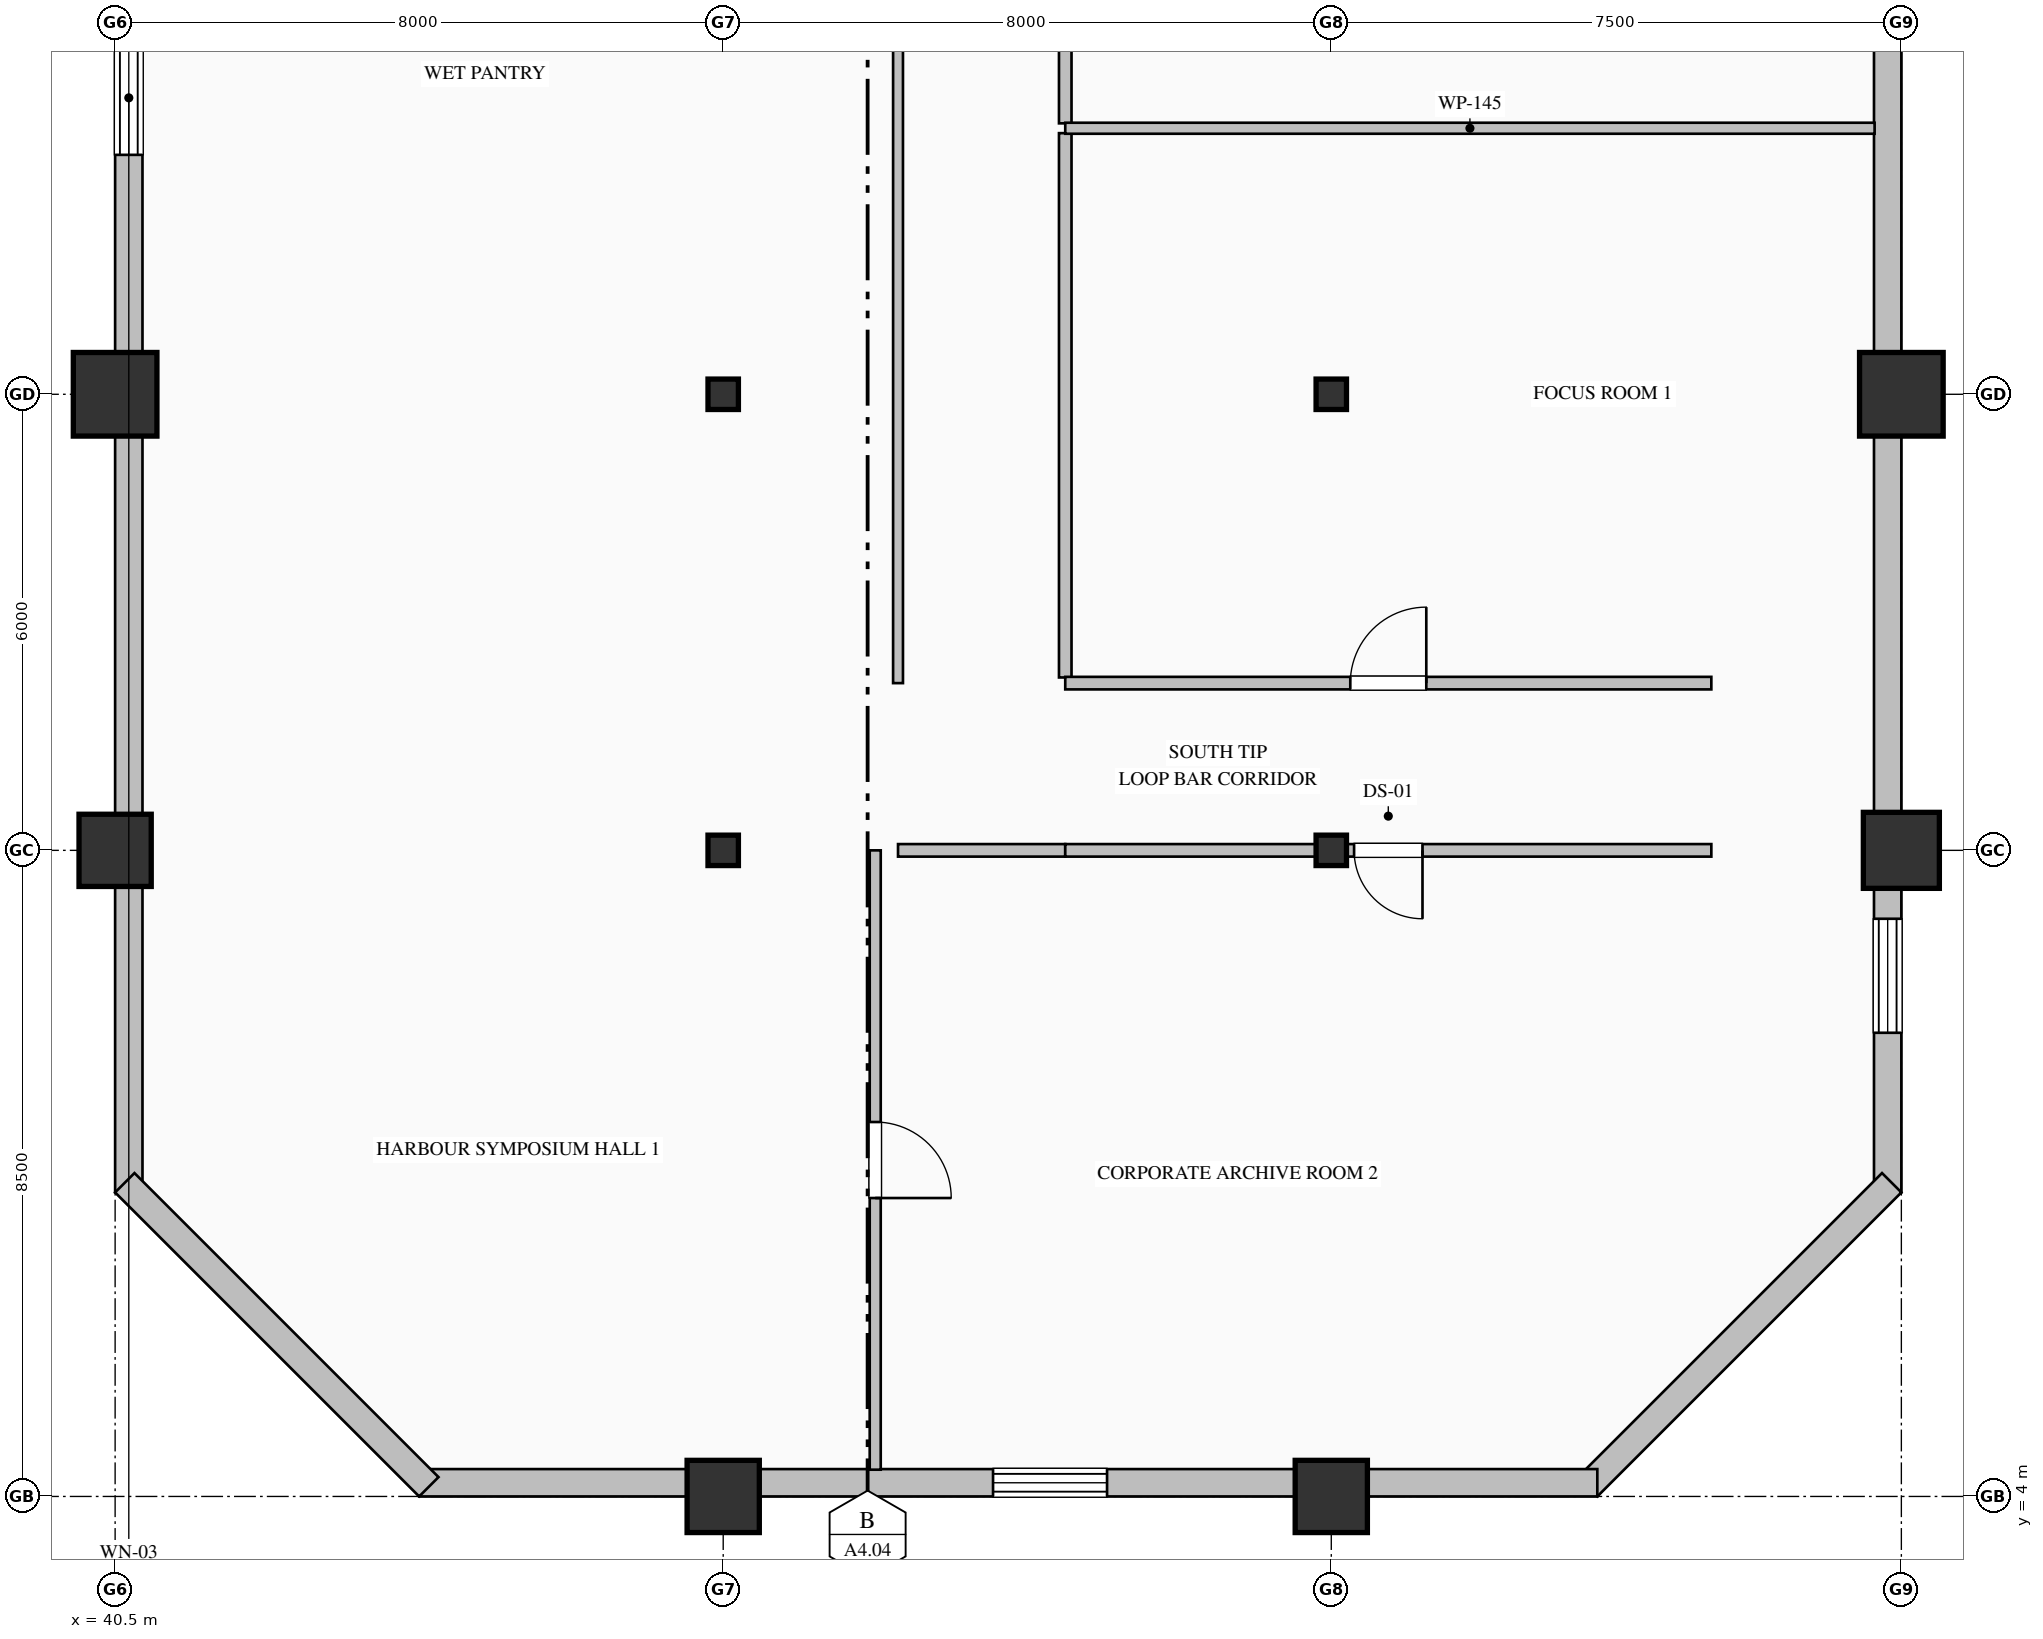
"""IFC4 building model, lengths in metres.
Left out: names, types, materials, properties, quantities, classifications, styles, units other than length and angle.
Written with IfcOpenShell. Run it as: python <this file> out.ifc"""

import sys

from ifc_helpers import new_model, si_unit, direction, frame, frame_2d, origin, origin_2d, place, context, subcontext, project, spatial, rectangle, hollow_rectangle, hollow_circle, i_section, extrude, element, fill, save


model = new_model("IFC4")
c1 = context("Model", 3, precision=1e-05, world=origin(), true_north=direction((0.0, 1.0)))
c2 = subcontext(c1, "Body", "Model", "MODEL_VIEW")
j1 = project(units=[si_unit("LENGTHUNIT", "METRE"), si_unit("PLANEANGLEUNIT", "RADIAN")], contexts=[c1])
p1 = place(None, origin())
s1 = spatial("IfcSite", under=j1, at=p1, CompositionType="ELEMENT")
p2 = place(p1, origin())
s2 = spatial("IfcBuilding", under=s1, at=p2, CompositionType="ELEMENT")
p3 = place(p2, frame((0.0, 0.0, 151.0)))
s3 = spatial("IfcBuildingStorey", under=s2, at=p3, CompositionType="ELEMENT", Elevation=151.0)
p4 = place(p3, frame((40.5, 12.5, 0.0), z_axis=(0.0, 0.0, 1.0), x_axis=(1.0, 0.0, 0.0)))
e1 = element("IfcColumn", 1, at=p4, inside=s3, PredefinedType="COLUMN", context=c2, shape_type="SweptSolid", body=[
    extrude(hollow_rectangle(XDim=0.95, YDim=0.95, WallThickness=0.036, at=origin_2d()), origin(), (0.0, 0.0, 1.0), 4.0),
])
p5 = place(p3, frame((40.5, 18.5, 0.0), z_axis=(0.0, 0.0, 1.0), x_axis=(1.0, 0.0, 0.0)))
e2 = element("IfcColumn", 2, at=p5, inside=s3, PredefinedType="COLUMN", context=c2, shape_type="SweptSolid", body=[
    extrude(hollow_rectangle(XDim=1.1, YDim=1.1, WallThickness=0.04, at=origin_2d()), origin(), (0.0, 0.0, 1.0), 4.0),
])
p6 = place(p3, frame((48.5, 4.0, 0.0), z_axis=(0.0, 0.0, 1.0), x_axis=(1.0, 0.0, 0.0)))
e3 = element("IfcColumn", 3, at=p6, inside=s3, PredefinedType="COLUMN", context=c2, shape_type="SweptSolid", body=[
    extrude(hollow_rectangle(XDim=0.95, YDim=0.95, WallThickness=0.036, at=origin_2d()), origin(), (0.0, 0.0, 1.0), 4.0),
])
for number, where, z_axis, x_axis in (
    (4, (48.5, 12.5, 0.0), (0.0, 0.0, 1.0), (1.0, 0.0, 0.0)),
    (5, (48.5, 18.5, 0.0), (0.0, 0.0, 1.0), (1.0, 0.0, 0.0)),
):
    element("IfcColumn", number, at=place(p3, frame(where, z_axis=z_axis, x_axis=x_axis)), inside=s3, PredefinedType="COLUMN", context=c2, shape_type="SweptSolid", body=[
        extrude(i_section(OverallWidth=0.4, OverallDepth=0.4, WebThickness=0.013, FlangeThickness=0.021, FilletRadius=0.022, at=origin_2d()), origin(), (0.0, 0.0, 1.0), 4.0),
    ])
p7 = place(p3, frame((56.5, 4.0, 0.0), z_axis=(0.0, 0.0, 1.0), x_axis=(1.0, 0.0, 0.0)))
e6 = element("IfcColumn", 6, at=p7, inside=s3, PredefinedType="COLUMN", context=c2, shape_type="SweptSolid", body=[
    extrude(hollow_rectangle(XDim=0.95, YDim=0.95, WallThickness=0.036, at=origin_2d()), origin(), (0.0, 0.0, 1.0), 4.0),
])
for number, where, z_axis, x_axis in (
    (7, (56.5, 12.5, 0.0), (0.0, 0.0, 1.0), (1.0, 0.0, 0.0)),
    (8, (56.5, 18.5, 0.0), (0.0, 0.0, 1.0), (1.0, 0.0, 0.0)),
):
    element("IfcColumn", number, at=place(p3, frame(where, z_axis=z_axis, x_axis=x_axis)), inside=s3, PredefinedType="COLUMN", context=c2, shape_type="SweptSolid", body=[
        extrude(i_section(OverallWidth=0.4, OverallDepth=0.4, WebThickness=0.013, FlangeThickness=0.021, FilletRadius=0.022, at=origin_2d()), origin(), (0.0, 0.0, 1.0), 4.0),
    ])
p8 = place(p3, frame((64.0, 12.5, 0.0), z_axis=(0.0, 0.0, 1.0), x_axis=(1.0, 0.0, 0.0)))
e9 = element("IfcColumn", 9, at=p8, inside=s3, PredefinedType="COLUMN", context=c2, shape_type="SweptSolid", body=[
    extrude(hollow_circle(Radius=0.5, WallThickness=0.036, at=origin_2d()), origin(), (0.0, 0.0, 1.0), 4.0),
])
p9 = place(p3, frame((64.0, 18.5, 0.0), z_axis=(0.0, 0.0, 1.0), x_axis=(1.0, 0.0, 0.0)))
e10 = element("IfcColumn", 10, at=p9, inside=s3, PredefinedType="COLUMN", context=c2, shape_type="SweptSolid", body=[
    extrude(hollow_rectangle(XDim=1.1, YDim=1.1, WallThickness=0.04, at=origin_2d()), origin(), (0.0, 0.0, 1.0), 4.0),
])
p10 = place(p3, frame((40.68, 8.0, 0.0), z_axis=(0.0, 0.0, 1.0), x_axis=(0.0, 1.0, 0.0)))
e11 = element("IfcWall", 11, at=p10, inside=s3, PredefinedType="SOLIDWALL", context=c2, shape_type="SweptSolid", body=[
    extrude(rectangle(XDim=20.36, YDim=0.36, at=frame_2d((10.18, 0.0))), origin(), (0.0, 0.0, 1.0), 3.165),
])
p11 = place(p10, frame((13.65, 0.0, 0.85)))
e12 = element("IfcOpeningElement", 12, at=p11, cuts=e11, PredefinedType="OPENING", context=c2, shape_type="SweptSolid", body=[
    extrude(rectangle(XDim=1.5, YDim=1.95, at=frame_2d((0.75, 0.975))), frame((0.0, 0.19, 0.0), z_axis=(0.0, -1.0, 0.0), x_axis=(1.0, 0.0, 0.0)), (0.0, 0.0, 1.0), 0.38),
])
p12 = place(p3, frame((63.82, 36.05, 0.0), z_axis=(0.0, 0.0, 1.0), x_axis=(0.0, -1.0, 0.0)))
e13 = element("IfcWall", 13, at=p12, inside=s3, PredefinedType="SOLIDWALL", context=c2, shape_type="SweptSolid", body=[
    extrude(rectangle(XDim=28.05, YDim=0.36, at=frame_2d((14.025, 0.0))), origin(), (0.0, 0.0, 1.0), 3.265),
])
p13 = place(p12, frame((2.85, 0.0, 0.85)))
e14 = element("IfcOpeningElement", 14, at=p13, cuts=e13, PredefinedType="OPENING", context=c2, shape_type="SweptSolid", body=[
    extrude(rectangle(XDim=1.5, YDim=1.95, at=frame_2d((0.75, 0.975))), frame((0.0, 0.19, 0.0), z_axis=(0.0, -1.0, 0.0), x_axis=(1.0, 0.0, 0.0)), (0.0, 0.0, 1.0), 0.38),
])
p14 = place(p12, frame((10.2, 0.0, 0.7)))
e15 = element("IfcOpeningElement", 15, at=p14, cuts=e13, PredefinedType="OPENING", context=c2, shape_type="SweptSolid", body=[
    extrude(rectangle(XDim=1.2, YDim=1.85, at=frame_2d((0.6, 0.925))), frame((0.0, 0.19, 0.0), z_axis=(0.0, -1.0, 0.0), x_axis=(1.0, 0.0, 0.0)), (0.0, 0.0, 1.0), 0.38),
])
p15 = place(p12, frame((24.45, 0.0, 0.85)))
e16 = element("IfcOpeningElement", 16, at=p15, cuts=e13, PredefinedType="OPENING", context=c2, shape_type="SweptSolid", body=[
    extrude(rectangle(XDim=1.5, YDim=1.95, at=frame_2d((0.75, 0.975))), frame((0.0, 0.19, 0.0), z_axis=(0.0, -1.0, 0.0), x_axis=(1.0, 0.0, 0.0)), (0.0, 0.0, 1.0), 0.38),
])
p16 = place(p3, frame((63.873, 8.127, 0.0), z_axis=(0.0, 0.0, 1.0), x_axis=(-0.707106781187, -0.707106781187, 0.0)))
e17 = element("IfcWall", 17, at=p16, inside=s3, PredefinedType="SOLIDWALL", context=c2, shape_type="SweptSolid", body=[
    extrude(rectangle(XDim=5.657, YDim=0.36, at=frame_2d((2.828, 0.0))), origin(), (0.0, 0.0, 1.0), 3.765),
])
p17 = place(p3, frame((60.0, 4.18, 0.0), z_axis=(0.0, 0.0, 1.0), x_axis=(-1.0, 0.0, 0.0)))
e18 = element("IfcWall", 18, at=p17, inside=s3, PredefinedType="SOLIDWALL", context=c2, shape_type="SweptSolid", body=[
    extrude(rectangle(XDim=15.5, YDim=0.36, at=frame_2d((7.75, 0.0))), origin(), (0.0, 0.0, 1.0), 3.265),
])
p18 = place(p17, frame((6.45, 0.0, 0.85)))
e19 = element("IfcOpeningElement", 19, at=p18, cuts=e18, PredefinedType="OPENING", context=c2, shape_type="SweptSolid", body=[
    extrude(rectangle(XDim=1.5, YDim=1.95, at=frame_2d((0.75, 0.975))), frame((0.0, 0.19, 0.0), z_axis=(0.0, -1.0, 0.0), x_axis=(1.0, 0.0, 0.0)), (0.0, 0.0, 1.0), 0.38),
])
p19 = place(p3, frame((44.627, 4.127, 0.0), z_axis=(0.0, 0.0, 1.0), x_axis=(-0.707106781187, 0.707106781187, 0.0)))
e20 = element("IfcWall", 20, at=p19, inside=s3, PredefinedType="SOLIDWALL", context=c2, shape_type="SweptSolid", body=[
    extrude(rectangle(XDim=5.657, YDim=0.36, at=frame_2d((2.828, 0.0))), origin(), (0.0, 0.0, 1.0), 3.765),
])
p20 = place(p3, frame((53.0, 33.525, 0.0), z_axis=(0.0, 0.0, 1.0), x_axis=(0.0, -1.0, 0.0)))
e21 = element("IfcWall", 21, at=p20, inside=s3, PredefinedType="PARTITIONING", context=c2, shape_type="SweptSolid", body=[
    extrude(rectangle(XDim=11.461, YDim=0.165, at=frame_2d((5.73, 0.0))), origin(), (0.0, 0.0, 1.0), 3.765),
])
p21 = place(p20, frame((5.23, 0.0, 0.0)))
e22 = element("IfcOpeningElement", 22, at=p21, cuts=e21, PredefinedType="OPENING", context=c2, shape_type="SweptSolid", body=[
    extrude(rectangle(XDim=1.0, YDim=2.15, at=frame_2d((0.5, 1.075))), frame((0.0, 0.093, 0.0), z_axis=(0.0, -1.0, 0.0), x_axis=(1.0, 0.0, 0.0)), (0.0, 0.0, 1.0), 0.185),
])
p22 = place(p3, frame((53.0, 21.936, 0.0), z_axis=(0.0, 0.0, 1.0), x_axis=(0.0, -1.0, 0.0)))
e23 = element("IfcWall", 23, at=p22, inside=s3, PredefinedType="PARTITIONING", context=c2, shape_type="SweptSolid", body=[
    extrude(rectangle(XDim=7.161, YDim=0.165, at=frame_2d((3.581, 0.0))), origin(), (0.0, 0.0, 1.0), 3.765),
])
p23 = place(p3, frame((50.8, 14.7, 0.0), z_axis=(0.0, 0.0, 1.0), x_axis=(0.0, 1.0, 0.0)))
e24 = element("IfcWall", 24, at=p23, inside=s3, PredefinedType="PARTITIONING", context=c2, shape_type="SweptSolid", body=[
    extrude(rectangle(XDim=18.843, YDim=0.13, at=frame_2d((9.421, 0.0))), origin(), (0.0, 0.0, 1.0), 3.765),
])
p24 = place(p23, frame((8.921, 0.0, 0.0)))
e25 = element("IfcOpeningElement", 25, at=p24, cuts=e24, PredefinedType="OPENING", context=c2, shape_type="SweptSolid", body=[
    extrude(rectangle(XDim=1.0, YDim=2.15, at=frame_2d((0.5, 1.075))), frame((0.0, 0.075, 0.0), z_axis=(0.0, -1.0, 0.0), x_axis=(1.0, 0.0, 0.0)), (0.0, 0.0, 1.0), 0.15),
])
p25 = place(p3, frame((53.0, 12.5, 0.0), z_axis=(0.0, 0.0, 1.0), x_axis=(-1.0, 0.0, 0.0)))
e26 = element("IfcWall", 26, at=p25, inside=s3, PredefinedType="PARTITIONING", context=c2, shape_type="SweptSolid", body=[
    extrude(rectangle(XDim=2.2, YDim=0.165, at=frame_2d((1.1, 0.0))), origin(), (0.0, 0.0, 1.0), 3.157),
])
p26 = place(p3, frame((53.0, 14.7, 0.0), z_axis=(0.0, 0.0, 1.0), x_axis=(1.0, 0.0, 0.0)))
e27 = element("IfcWall", 27, at=p26, inside=s3, PredefinedType="PARTITIONING", context=c2, shape_type="SweptSolid", body=[
    extrude(rectangle(XDim=8.5, YDim=0.165, at=frame_2d((4.25, 0.0))), origin(), (0.0, 0.0, 1.0), 3.765),
])
p27 = place(p26, frame((3.75, 0.0, 0.0)))
e28 = element("IfcOpeningElement", 28, at=p27, cuts=e27, PredefinedType="OPENING", context=c2, shape_type="SweptSolid", body=[
    extrude(rectangle(XDim=1.0, YDim=2.15, at=frame_2d((0.5, 1.075))), frame((0.0, 0.093, 0.0), z_axis=(0.0, -1.0, 0.0), x_axis=(1.0, 0.0, 0.0)), (0.0, 0.0, 1.0), 0.185),
])
p28 = place(p3, frame((61.5, 12.5, 0.0), z_axis=(0.0, 0.0, 1.0), x_axis=(-1.0, 0.0, 0.0)))
e29 = element("IfcWall", 29, at=p28, inside=s3, PredefinedType="PARTITIONING", context=c2, shape_type="SweptSolid", body=[
    extrude(rectangle(XDim=8.5, YDim=0.165, at=frame_2d((4.25, 0.0))), origin(), (0.0, 0.0, 1.0), 3.157),
])
p29 = place(p28, frame((3.8, 0.0, 0.0)))
e30 = element("IfcOpeningElement", 30, at=p29, cuts=e29, PredefinedType="OPENING", context=c2, shape_type="SweptSolid", body=[
    extrude(rectangle(XDim=0.9, YDim=2.15, at=frame_2d((0.45, 1.075))), frame((0.0, 0.093, 0.0), z_axis=(0.0, -1.0, 0.0), x_axis=(1.0, 0.0, 0.0)), (0.0, 0.0, 1.0), 0.185),
])
p30 = place(p3, frame((63.648, 22.0, 0.0), z_axis=(0.0, 0.0, 1.0), x_axis=(-1.0, 0.0, 0.0)))
e31 = element("IfcWall", 31, at=p30, inside=s3, PredefinedType="PARTITIONING", context=c2, shape_type="SweptSolid", body=[
    extrude(rectangle(XDim=10.648, YDim=0.145, at=frame_2d((5.324, 0.0))), origin(), (0.0, 0.0, 1.0), 3.765),
])
p31 = place(p3, frame((50.5, 12.5, 0.0), z_axis=(0.0, 0.0, 1.0), x_axis=(0.0, -1.0, 0.0)))
e32 = element("IfcWall", 32, at=p31, inside=s3, PredefinedType="PARTITIONING", context=c2, shape_type="SweptSolid", body=[
    extrude(rectangle(XDim=8.148, YDim=0.145, at=frame_2d((4.074, 0.0))), origin(), (0.0, 0.0, 1.0), 3.765),
])
p32 = place(p31, frame((3.574, 0.0, 0.0)))
e33 = element("IfcOpeningElement", 33, at=p32, cuts=e32, PredefinedType="OPENING", context=c2, shape_type="SweptSolid", body=[
    extrude(rectangle(XDim=1.0, YDim=2.15, at=frame_2d((0.5, 1.075))), frame((0.0, 0.083, 0.0), z_axis=(0.0, -1.0, 0.0), x_axis=(1.0, 0.0, 0.0)), (0.0, 0.0, 1.0), 0.165),
])
p33 = place(p11, origin())
e34 = element("IfcWindow", 34, at=p33, inside=s3, PartitioningType="DOUBLE_PANEL_VERTICAL", PredefinedType="WINDOW", context=c2, shape_type="SweptSolid", body=[
    extrude(rectangle(XDim=1.5, YDim=1.95, at=frame_2d((0.75, 0.975))), frame((0.0, 0.15, 0.0), z_axis=(0.0, -1.0, 0.0), x_axis=(1.0, 0.0, 0.0)), (0.0, 0.0, 1.0), 0.06),
])
fill(e12, e34)
p34 = place(p15, origin())
e35 = element("IfcWindow", 35, at=p34, inside=s3, PartitioningType="DOUBLE_PANEL_VERTICAL", PredefinedType="WINDOW", context=c2, shape_type="SweptSolid", body=[
    extrude(rectangle(XDim=1.5, YDim=1.95, at=frame_2d((0.75, 0.975))), frame((0.0, 0.15, 0.0), z_axis=(0.0, -1.0, 0.0), x_axis=(1.0, 0.0, 0.0)), (0.0, 0.0, 1.0), 0.06),
])
fill(e16, e35)
p35 = place(p18, origin())
e36 = element("IfcWindow", 36, at=p35, inside=s3, PartitioningType="DOUBLE_PANEL_VERTICAL", PredefinedType="WINDOW", context=c2, shape_type="SweptSolid", body=[
    extrude(rectangle(XDim=1.5, YDim=1.95, at=frame_2d((0.75, 0.975))), frame((0.0, 0.15, 0.0), z_axis=(0.0, -1.0, 0.0), x_axis=(1.0, 0.0, 0.0)), (0.0, 0.0, 1.0), 0.06),
])
fill(e19, e36)
p36 = place(p27, origin())
e37 = element("IfcDoor", 37, at=p36, inside=s3, OperationType="SINGLE_SWING_RIGHT", PredefinedType="DOOR", context=c2, shape_type="SweptSolid", body=[
    extrude(rectangle(XDim=1.0, YDim=2.15, at=frame_2d((0.5, 1.075))), frame((0.0, 0.025, 0.0), z_axis=(0.0, -1.0, 0.0), x_axis=(1.0, 0.0, 0.0)), (0.0, 0.0, 1.0), 0.05),
])
fill(e28, e37)
p37 = place(p32, origin())
e38 = element("IfcDoor", 38, at=p37, inside=s3, OperationType="SINGLE_SWING_RIGHT", PredefinedType="DOOR", context=c2, shape_type="SweptSolid", body=[
    extrude(rectangle(XDim=1.0, YDim=2.15, at=frame_2d((0.5, 1.075))), frame((0.0, 0.025, 0.0), z_axis=(0.0, -1.0, 0.0), x_axis=(1.0, 0.0, 0.0)), (0.0, 0.0, 1.0), 0.05),
])
fill(e33, e38)
p38 = place(p29, origin())
e39 = element("IfcDoor", 39, at=p38, inside=s3, OperationType="SINGLE_SWING_LEFT", PredefinedType="DOOR", context=c2, shape_type="SweptSolid", body=[
    extrude(rectangle(XDim=0.9, YDim=2.15, at=frame_2d((0.45, 1.075))), frame((0.0, 0.025, 0.0), z_axis=(0.0, -1.0, 0.0), x_axis=(1.0, 0.0, 0.0)), (0.0, 0.0, 1.0), 0.05),
])
fill(e30, e39)
save(model, sys.argv[1])
